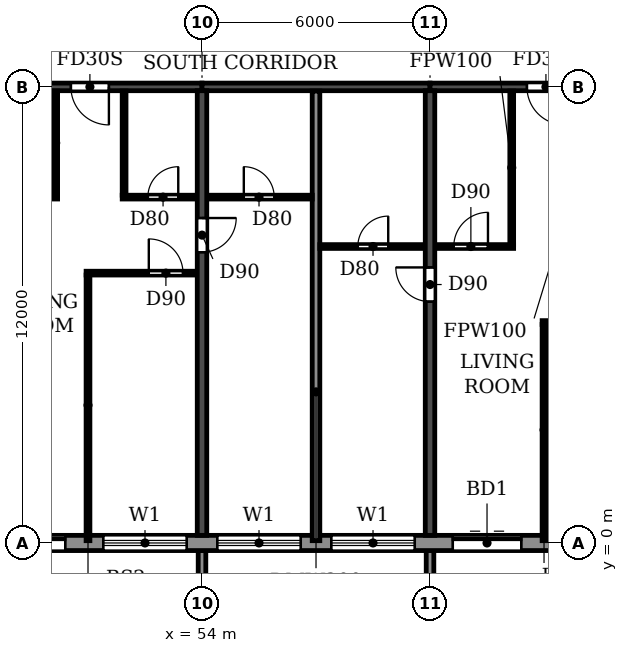
"""IFC4 building model, lengths in metres.
Left out: names, types, materials, properties, quantities, classifications, styles, units other than length and angle.
Written with IfcOpenShell. Run it as: python <this file> out.ifc"""

import sys

from ifc_helpers import new_model, si_unit, direction, frame, frame_2d, origin, place, context, subcontext, project, spatial, polyline, rectangle, outline, extrude, source, transform, mapped, element, fill, save


model = new_model("IFC4")
c1 = context("Model", 3, precision=1e-05, world=origin(), true_north=direction((0.0, 1.0)))
c2 = subcontext(c1, "Body", "Model", "MODEL_VIEW")
j1 = project(units=[si_unit("LENGTHUNIT", "METRE"), si_unit("PLANEANGLEUNIT", "RADIAN")], contexts=[c1])
p1 = place(None, origin())
s1 = spatial("IfcSite", under=j1, at=p1, CompositionType="ELEMENT")
p2 = place(p1, origin())
s2 = spatial("IfcBuilding", under=s1, at=p2, CompositionType="ELEMENT")
p3 = place(p2, frame((0.0, 0.0, 221.4)))
s3 = spatial("IfcBuildingStorey", under=s2, at=p3, CompositionType="ELEMENT", Elevation=221.4)
p4 = place(p3, frame((54.0, 0.2, 0.0), z_axis=(0.0, 0.0, 1.0), x_axis=(0.0, 1.0, 0.0)))
e1 = element("IfcWall", 1, at=p4, inside=s3, PredefinedType="SHEAR", context=c2, shape_type="SweptSolid", body=[
    extrude(rectangle(XDim=11.7, YDim=0.25, at=frame_2d((5.85, 0.0))), origin(), (0.0, 0.0, 1.0), 3.08),
])
p5 = place(p4, frame((7.45, 0.0, 0.0)))
e2 = element("IfcOpeningElement", 2, at=p5, cuts=e1, PredefinedType="OPENING", context=c2, shape_type="SweptSolid", body=[
    extrude(rectangle(XDim=0.9, YDim=2.1, at=frame_2d((0.45, 1.05))), frame((0.0, 0.135, 0.0), z_axis=(0.0, -1.0, 0.0), x_axis=(1.0, 0.0, 0.0)), (0.0, 0.0, 1.0), 0.27),
])
p6 = place(p3, frame((60.0, 0.2, 0.0), z_axis=(0.0, 0.0, 1.0), x_axis=(0.0, 1.0, 0.0)))
e3 = element("IfcWall", 3, at=p6, inside=s3, PredefinedType="SHEAR", context=c2, shape_type="SweptSolid", body=[
    extrude(rectangle(XDim=11.7, YDim=0.25, at=frame_2d((5.85, 0.0))), origin(), (0.0, 0.0, 1.0), 3.08),
])
p7 = place(p6, frame((6.15, 0.0, 0.0)))
e4 = element("IfcOpeningElement", 4, at=p7, cuts=e3, PredefinedType="OPENING", context=c2, shape_type="SweptSolid", body=[
    extrude(rectangle(XDim=0.9, YDim=2.1, at=frame_2d((0.45, 1.05))), frame((0.0, 0.135, 0.0), z_axis=(0.0, -1.0, 0.0), x_axis=(1.0, 0.0, 0.0)), (0.0, 0.0, 1.0), 0.27),
])
p8 = place(p3, frame((48.0, 12.0, 0.0), z_axis=(0.0, 0.0, 1.0), x_axis=(1.0, 0.0, 0.0)))
e5 = element("IfcWall", 5, at=p8, inside=s3, PredefinedType="SHEAR", context=c2, shape_type="SweptSolid", body=[
    extrude(rectangle(XDim=6.0, YDim=0.2, at=frame_2d((3.0, 0.0))), origin(), (0.0, 0.0, 1.0), 2.48),
])
p9 = place(p8, frame((2.55, 0.0, 0.0)))
e6 = element("IfcOpeningElement", 6, at=p9, cuts=e5, PredefinedType="OPENING", context=c2, shape_type="SweptSolid", body=[
    extrude(rectangle(XDim=1.0, YDim=2.1, at=frame_2d((0.5, 1.05))), frame((0.0, 0.11, 0.0), z_axis=(0.0, -1.0, 0.0), x_axis=(1.0, 0.0, 0.0)), (0.0, 0.0, 1.0), 0.22),
])
p10 = place(p3, frame((54.0, 12.0, 0.0), z_axis=(0.0, 0.0, 1.0), x_axis=(1.0, 0.0, 0.0)))
e7 = element("IfcWall", 7, at=p10, inside=s3, PredefinedType="SHEAR", context=c2, shape_type="SweptSolid", body=[
    extrude(rectangle(XDim=6.0, YDim=0.2, at=frame_2d((3.0, 0.0))), origin(), (0.0, 0.0, 1.0), 2.48),
])
p11 = place(p3, frame((60.0, 12.0, 0.0), z_axis=(0.0, 0.0, 1.0), x_axis=(1.0, 0.0, 0.0)))
e8 = element("IfcWall", 8, at=p11, inside=s3, PredefinedType="SHEAR", context=c2, shape_type="SweptSolid", body=[
    extrude(rectangle(XDim=6.0, YDim=0.2, at=frame_2d((3.0, 0.0))), origin(), (0.0, 0.0, 1.0), 2.48),
])
p12 = place(p11, frame((2.55, 0.0, 0.0)))
e9 = element("IfcOpeningElement", 9, at=p12, cuts=e8, PredefinedType="OPENING", context=c2, shape_type="SweptSolid", body=[
    extrude(rectangle(XDim=1.0, YDim=2.1, at=frame_2d((0.5, 1.05))), frame((0.0, 0.11, 0.0), z_axis=(0.0, -1.0, 0.0), x_axis=(1.0, 0.0, 0.0)), (0.0, 0.0, 1.0), 0.22),
])
p13 = place(p3, frame((22.683, 0.0, 0.0), z_axis=(0.0, 0.0, 1.0), x_axis=(1.0, 0.0, 0.0)))
e10 = element("IfcWall", 10, at=p13, inside=s3, PredefinedType="STANDARD", context=c2, shape_type="SweptSolid", body=[
    extrude(rectangle(XDim=56.634, YDim=0.4, at=frame_2d((28.317, 0.0))), origin(), (0.0, 0.0, 1.0), 3.08),
])
p14 = place(p13, frame((1.717, 0.0, 0.9)))
e11 = element("IfcOpeningElement", 11, at=p14, cuts=e10, PredefinedType="OPENING", context=c2, shape_type="SweptSolid", body=[
    extrude(rectangle(XDim=2.2, YDim=1.5, at=frame_2d((1.1, 0.75))), frame((0.0, 0.21, 0.0), z_axis=(0.0, -1.0, 0.0), x_axis=(1.0, 0.0, 0.0)), (0.0, 0.0, 1.0), 0.42),
])
p15 = place(p13, frame((4.917, 0.0, 0.0)))
e12 = element("IfcOpeningElement", 12, at=p15, cuts=e10, PredefinedType="OPENING", context=c2, shape_type="SweptSolid", body=[
    extrude(rectangle(XDim=1.8, YDim=2.4, at=frame_2d((0.9, 1.2))), frame((0.0, 0.21, 0.0), z_axis=(0.0, -1.0, 0.0), x_axis=(1.0, 0.0, 0.0)), (0.0, 0.0, 1.0), 0.42),
])
p16 = place(p13, frame((7.717, 0.0, 0.9)))
e13 = element("IfcOpeningElement", 13, at=p16, cuts=e10, PredefinedType="OPENING", context=c2, shape_type="SweptSolid", body=[
    extrude(rectangle(XDim=2.2, YDim=1.5, at=frame_2d((1.1, 0.75))), frame((0.0, 0.21, 0.0), z_axis=(0.0, -1.0, 0.0), x_axis=(1.0, 0.0, 0.0)), (0.0, 0.0, 1.0), 0.42),
])
p17 = place(p13, frame((10.717, 0.0, 0.9)))
e14 = element("IfcOpeningElement", 14, at=p17, cuts=e10, PredefinedType="OPENING", context=c2, shape_type="SweptSolid", body=[
    extrude(rectangle(XDim=2.2, YDim=1.5, at=frame_2d((1.1, 0.75))), frame((0.0, 0.21, 0.0), z_axis=(0.0, -1.0, 0.0), x_axis=(1.0, 0.0, 0.0)), (0.0, 0.0, 1.0), 0.42),
])
p18 = place(p13, frame((13.717, 0.0, 0.9)))
e15 = element("IfcOpeningElement", 15, at=p18, cuts=e10, PredefinedType="OPENING", context=c2, shape_type="SweptSolid", body=[
    extrude(rectangle(XDim=2.2, YDim=1.5, at=frame_2d((1.1, 0.75))), frame((0.0, 0.21, 0.0), z_axis=(0.0, -1.0, 0.0), x_axis=(1.0, 0.0, 0.0)), (0.0, 0.0, 1.0), 0.42),
])
p19 = place(p13, frame((16.917, 0.0, 0.0)))
e16 = element("IfcOpeningElement", 16, at=p19, cuts=e10, PredefinedType="OPENING", context=c2, shape_type="SweptSolid", body=[
    extrude(rectangle(XDim=1.8, YDim=2.4, at=frame_2d((0.9, 1.2))), frame((0.0, 0.21, 0.0), z_axis=(0.0, -1.0, 0.0), x_axis=(1.0, 0.0, 0.0)), (0.0, 0.0, 1.0), 0.42),
])
p20 = place(p13, frame((19.717, 0.0, 0.9)))
e17 = element("IfcOpeningElement", 17, at=p20, cuts=e10, PredefinedType="OPENING", context=c2, shape_type="SweptSolid", body=[
    extrude(rectangle(XDim=2.2, YDim=1.5, at=frame_2d((1.1, 0.75))), frame((0.0, 0.21, 0.0), z_axis=(0.0, -1.0, 0.0), x_axis=(1.0, 0.0, 0.0)), (0.0, 0.0, 1.0), 0.42),
])
p21 = place(p13, frame((22.717, 0.0, 0.9)))
e18 = element("IfcOpeningElement", 18, at=p21, cuts=e10, PredefinedType="OPENING", context=c2, shape_type="SweptSolid", body=[
    extrude(rectangle(XDim=2.2, YDim=1.5, at=frame_2d((1.1, 0.75))), frame((0.0, 0.21, 0.0), z_axis=(0.0, -1.0, 0.0), x_axis=(1.0, 0.0, 0.0)), (0.0, 0.0, 1.0), 0.42),
])
p22 = place(p13, frame((25.917, 0.0, 0.0)))
e19 = element("IfcOpeningElement", 19, at=p22, cuts=e10, PredefinedType="OPENING", context=c2, shape_type="SweptSolid", body=[
    extrude(rectangle(XDim=1.8, YDim=2.4, at=frame_2d((0.9, 1.2))), frame((0.0, 0.21, 0.0), z_axis=(0.0, -1.0, 0.0), x_axis=(1.0, 0.0, 0.0)), (0.0, 0.0, 1.0), 0.42),
])
p23 = place(p13, frame((28.717, 0.0, 0.9)))
e20 = element("IfcOpeningElement", 20, at=p23, cuts=e10, PredefinedType="OPENING", context=c2, shape_type="SweptSolid", body=[
    extrude(rectangle(XDim=2.2, YDim=1.5, at=frame_2d((1.1, 0.75))), frame((0.0, 0.21, 0.0), z_axis=(0.0, -1.0, 0.0), x_axis=(1.0, 0.0, 0.0)), (0.0, 0.0, 1.0), 0.42),
])
p24 = place(p13, frame((31.717, 0.0, 0.9)))
e21 = element("IfcOpeningElement", 21, at=p24, cuts=e10, PredefinedType="OPENING", context=c2, shape_type="SweptSolid", body=[
    extrude(rectangle(XDim=2.2, YDim=1.5, at=frame_2d((1.1, 0.75))), frame((0.0, 0.21, 0.0), z_axis=(0.0, -1.0, 0.0), x_axis=(1.0, 0.0, 0.0)), (0.0, 0.0, 1.0), 0.42),
])
p25 = place(p13, frame((34.717, 0.0, 0.9)))
e22 = element("IfcOpeningElement", 22, at=p25, cuts=e10, PredefinedType="OPENING", context=c2, shape_type="SweptSolid", body=[
    extrude(rectangle(XDim=2.2, YDim=1.5, at=frame_2d((1.1, 0.75))), frame((0.0, 0.21, 0.0), z_axis=(0.0, -1.0, 0.0), x_axis=(1.0, 0.0, 0.0)), (0.0, 0.0, 1.0), 0.42),
])
p26 = place(p13, frame((37.917, 0.0, 0.0)))
e23 = element("IfcOpeningElement", 23, at=p26, cuts=e10, PredefinedType="OPENING", context=c2, shape_type="SweptSolid", body=[
    extrude(rectangle(XDim=1.8, YDim=2.4, at=frame_2d((0.9, 1.2))), frame((0.0, 0.21, 0.0), z_axis=(0.0, -1.0, 0.0), x_axis=(1.0, 0.0, 0.0)), (0.0, 0.0, 1.0), 0.42),
])
p27 = place(p13, frame((40.717, 0.0, 0.9)))
e24 = element("IfcOpeningElement", 24, at=p27, cuts=e10, PredefinedType="OPENING", context=c2, shape_type="SweptSolid", body=[
    extrude(rectangle(XDim=2.2, YDim=1.5, at=frame_2d((1.1, 0.75))), frame((0.0, 0.21, 0.0), z_axis=(0.0, -1.0, 0.0), x_axis=(1.0, 0.0, 0.0)), (0.0, 0.0, 1.0), 0.42),
])
p28 = place(p13, frame((43.717, 0.0, 0.9)))
e25 = element("IfcOpeningElement", 25, at=p28, cuts=e10, PredefinedType="OPENING", context=c2, shape_type="SweptSolid", body=[
    extrude(rectangle(XDim=2.2, YDim=1.5, at=frame_2d((1.1, 0.75))), frame((0.0, 0.21, 0.0), z_axis=(0.0, -1.0, 0.0), x_axis=(1.0, 0.0, 0.0)), (0.0, 0.0, 1.0), 0.42),
])
p29 = place(p13, frame((46.717, 0.0, 0.9)))
e26 = element("IfcOpeningElement", 26, at=p29, cuts=e10, PredefinedType="OPENING", context=c2, shape_type="SweptSolid", body=[
    extrude(rectangle(XDim=2.2, YDim=1.5, at=frame_2d((1.1, 0.75))), frame((0.0, 0.21, 0.0), z_axis=(0.0, -1.0, 0.0), x_axis=(1.0, 0.0, 0.0)), (0.0, 0.0, 1.0), 0.42),
])
p30 = place(p13, frame((49.917, 0.0, 0.0)))
e27 = element("IfcOpeningElement", 27, at=p30, cuts=e10, PredefinedType="OPENING", context=c2, shape_type="SweptSolid", body=[
    extrude(rectangle(XDim=1.8, YDim=2.4, at=frame_2d((0.9, 1.2))), frame((0.0, 0.21, 0.0), z_axis=(0.0, -1.0, 0.0), x_axis=(1.0, 0.0, 0.0)), (0.0, 0.0, 1.0), 0.42),
])
p31 = place(p13, frame((52.717, 0.0, 0.9)))
e28 = element("IfcOpeningElement", 28, at=p31, cuts=e10, PredefinedType="OPENING", context=c2, shape_type="SweptSolid", body=[
    extrude(rectangle(XDim=2.2, YDim=1.5, at=frame_2d((1.1, 0.75))), frame((0.0, 0.21, 0.0), z_axis=(0.0, -1.0, 0.0), x_axis=(1.0, 0.0, 0.0)), (0.0, 0.0, 1.0), 0.42),
])
m1 = source(origin(), c2, "Body", "SweptSolid", [
    extrude(outline(polyline([(0.0, 0.0), (0.2, 0.0), (0.2, 1.65), (0.0, 1.65), (0.0, 0.0)])), origin(), (0.0, 0.0, 1.0), 3.1),
])
for number, where in (
    (29, (53.9, -1.85, 0.0)),
    (30, (59.9, -1.85, 0.0)),
):
    element("IfcWall", number, at=place(p3, frame(where)), inside=s3, PredefinedType="STANDARD", context=c2, shape_type="MappedRepresentation", body=[
        mapped(m1, transform((0.0, 0.0, 0.0))),
    ])
p32 = place(p3, frame((57.0, 0.06, 0.0), z_axis=(0.0, 0.0, 1.0), x_axis=(0.0, 1.0, 0.0)))
e31 = element("IfcWall", 31, at=p32, inside=s3, PredefinedType="PARTITIONING", context=c2, shape_type="SweptSolid", body=[
    extrude(rectangle(XDim=11.83, YDim=0.2, at=frame_2d((5.915, 0.0))), origin(), (0.0, 0.0, 1.0), 3.08),
])
p33 = place(p3, frame((62.95, 5.8, 0.0), z_axis=(0.0, 0.0, 1.0), x_axis=(1.0, 0.0, 0.0)))
e32 = element("IfcWall", 32, at=p33, inside=s3, PredefinedType="PARTITIONING", context=c2, shape_type="SweptSolid", body=[
    extrude(rectangle(XDim=2.915, YDim=0.1, at=frame_2d((1.458, 0.0))), origin(), (0.0, 0.0, 1.0), 3.08),
])
p34 = place(p33, frame((0.55, 0.0, 0.0)))
e33 = element("IfcOpeningElement", 33, at=p34, cuts=e32, PredefinedType="OPENING", context=c2, shape_type="SweptSolid", body=[
    extrude(rectangle(XDim=0.9, YDim=2.1, at=frame_2d((0.45, 1.05))), frame((0.0, 0.06, 0.0), z_axis=(0.0, -1.0, 0.0), x_axis=(1.0, 0.0, 0.0)), (0.0, 0.0, 1.0), 0.12),
])
p35 = place(p3, frame((50.95, 7.1, 0.0), z_axis=(0.0, 0.0, 1.0), x_axis=(1.0, 0.0, 0.0)))
e34 = element("IfcWall", 34, at=p35, inside=s3, PredefinedType="PARTITIONING", context=c2, shape_type="SweptSolid", body=[
    extrude(rectangle(XDim=2.915, YDim=0.1, at=frame_2d((1.458, 0.0))), origin(), (0.0, 0.0, 1.0), 3.08),
])
p36 = place(p35, frame((1.65, 0.0, 0.0)))
e35 = element("IfcOpeningElement", 35, at=p36, cuts=e34, PredefinedType="OPENING", context=c2, shape_type="SweptSolid", body=[
    extrude(rectangle(XDim=0.9, YDim=2.1, at=frame_2d((0.45, 1.05))), frame((0.0, 0.06, 0.0), z_axis=(0.0, -1.0, 0.0), x_axis=(1.0, 0.0, 0.0)), (0.0, 0.0, 1.0), 0.12),
])
p37 = place(p3, frame((57.1, 7.8, 0.0), z_axis=(0.0, 0.0, 1.0), x_axis=(1.0, 0.0, 0.0)))
e36 = element("IfcWall", 36, at=p37, inside=s3, PredefinedType="PARTITIONING", context=c2, shape_type="SweptSolid", body=[
    extrude(rectangle(XDim=2.765, YDim=0.1, at=frame_2d((1.382, 0.0))), origin(), (0.0, 0.0, 1.0), 3.08),
])
p38 = place(p37, frame((1.0, 0.0, 0.0)))
e37 = element("IfcOpeningElement", 37, at=p38, cuts=e36, PredefinedType="OPENING", context=c2, shape_type="SweptSolid", body=[
    extrude(rectangle(XDim=0.8, YDim=2.1, at=frame_2d((0.4, 1.05))), frame((0.0, 0.06, 0.0), z_axis=(0.0, -1.0, 0.0), x_axis=(1.0, 0.0, 0.0)), (0.0, 0.0, 1.0), 0.12),
])
p39 = place(p3, frame((60.135, 7.8, 0.0), z_axis=(0.0, 0.0, 1.0), x_axis=(1.0, 0.0, 0.0)))
e38 = element("IfcWall", 38, at=p39, inside=s3, PredefinedType="PARTITIONING", context=c2, shape_type="SweptSolid", body=[
    extrude(rectangle(XDim=2.065, YDim=0.1, at=frame_2d((1.032, 0.0))), origin(), (0.0, 0.0, 1.0), 3.08),
])
p40 = place(p39, frame((0.49, 0.0, 0.0)))
e39 = element("IfcOpeningElement", 39, at=p40, cuts=e38, PredefinedType="OPENING", context=c2, shape_type="SweptSolid", body=[
    extrude(rectangle(XDim=0.9, YDim=2.1, at=frame_2d((0.45, 1.05))), frame((0.0, 0.06, 0.0), z_axis=(0.0, -1.0, 0.0), x_axis=(1.0, 0.0, 0.0)), (0.0, 0.0, 1.0), 0.12),
])
p41 = place(p3, frame((48.135, 9.1, 0.0), z_axis=(0.0, 0.0, 1.0), x_axis=(1.0, 0.0, 0.0)))
e40 = element("IfcWall", 40, at=p41, inside=s3, PredefinedType="PARTITIONING", context=c2, shape_type="SweptSolid", body=[
    extrude(rectangle(XDim=2.065, YDim=0.1, at=frame_2d((1.032, 0.0))), origin(), (0.0, 0.0, 1.0), 3.08),
])
p42 = place(p41, frame((0.49, 0.0, 0.0)))
e41 = element("IfcOpeningElement", 41, at=p42, cuts=e40, PredefinedType="OPENING", context=c2, shape_type="SweptSolid", body=[
    extrude(rectangle(XDim=0.9, YDim=2.1, at=frame_2d((0.45, 1.05))), frame((0.0, 0.06, 0.0), z_axis=(0.0, -1.0, 0.0), x_axis=(1.0, 0.0, 0.0)), (0.0, 0.0, 1.0), 0.12),
])
p43 = place(p3, frame((51.9, 9.1, 0.0), z_axis=(0.0, 0.0, 1.0), x_axis=(1.0, 0.0, 0.0)))
e42 = element("IfcWall", 42, at=p43, inside=s3, PredefinedType="PARTITIONING", context=c2, shape_type="SweptSolid", body=[
    extrude(rectangle(XDim=1.965, YDim=0.1, at=frame_2d((0.982, 0.0))), origin(), (0.0, 0.0, 1.0), 3.08),
])
p44 = place(p43, frame((0.675, 0.0, 0.0)))
e43 = element("IfcOpeningElement", 43, at=p44, cuts=e42, PredefinedType="OPENING", context=c2, shape_type="SweptSolid", body=[
    extrude(rectangle(XDim=0.8, YDim=2.1, at=frame_2d((0.4, 1.05))), frame((0.0, 0.06, 0.0), z_axis=(0.0, -1.0, 0.0), x_axis=(1.0, 0.0, 0.0)), (0.0, 0.0, 1.0), 0.12),
])
p45 = place(p3, frame((54.135, 9.1, 0.0), z_axis=(0.0, 0.0, 1.0), x_axis=(1.0, 0.0, 0.0)))
e44 = element("IfcWall", 44, at=p45, inside=s3, PredefinedType="PARTITIONING", context=c2, shape_type="SweptSolid", body=[
    extrude(rectangle(XDim=2.765, YDim=0.1, at=frame_2d((1.382, 0.0))), origin(), (0.0, 0.0, 1.0), 3.08),
])
p46 = place(p45, frame((0.965, 0.0, 0.0)))
e45 = element("IfcOpeningElement", 45, at=p46, cuts=e44, PredefinedType="OPENING", context=c2, shape_type="SweptSolid", body=[
    extrude(rectangle(XDim=0.8, YDim=2.1, at=frame_2d((0.4, 1.05))), frame((0.0, 0.06, 0.0), z_axis=(0.0, -1.0, 0.0), x_axis=(1.0, 0.0, 0.0)), (0.0, 0.0, 1.0), 0.12),
])
p47 = place(p3, frame((50.15, 9.15, 0.0), z_axis=(0.0, 0.0, 1.0), x_axis=(0.0, 1.0, 0.0)))
e46 = element("IfcWall", 46, at=p47, inside=s3, PredefinedType="PARTITIONING", context=c2, shape_type="SweptSolid", body=[
    extrude(rectangle(XDim=2.74, YDim=0.1, at=frame_2d((1.37, 0.0))), origin(), (0.0, 0.0, 1.0), 3.08),
])
p48 = place(p3, frame((51.0, 0.06, 0.0), z_axis=(0.0, 0.0, 1.0), x_axis=(0.0, 1.0, 0.0)))
e47 = element("IfcWall", 47, at=p48, inside=s3, PredefinedType="PARTITIONING", context=c2, shape_type="SweptSolid", body=[
    extrude(rectangle(XDim=6.99, YDim=0.1, at=frame_2d((3.495, 0.0))), origin(), (0.0, 0.0, 1.0), 3.08),
])
p49 = place(p3, frame((51.95, 9.15, 0.0), z_axis=(0.0, 0.0, 1.0), x_axis=(0.0, 1.0, 0.0)))
e48 = element("IfcWall", 48, at=p49, inside=s3, PredefinedType="PARTITIONING", context=c2, shape_type="SweptSolid", body=[
    extrude(rectangle(XDim=2.74, YDim=0.1, at=frame_2d((1.37, 0.0))), origin(), (0.0, 0.0, 1.0), 3.08),
])
p50 = place(p3, frame((62.15, 7.85, 0.0), z_axis=(0.0, 0.0, 1.0), x_axis=(0.0, 1.0, 0.0)))
e49 = element("IfcWall", 49, at=p50, inside=s3, PredefinedType="PARTITIONING", context=c2, shape_type="SweptSolid", body=[
    extrude(rectangle(XDim=4.04, YDim=0.1, at=frame_2d((2.02, 0.0))), origin(), (0.0, 0.0, 1.0), 3.08),
])
p51 = place(p3, frame((63.0, 0.06, 0.0), z_axis=(0.0, 0.0, 1.0), x_axis=(0.0, 1.0, 0.0)))
e50 = element("IfcWall", 50, at=p51, inside=s3, PredefinedType="PARTITIONING", context=c2, shape_type="SweptSolid", body=[
    extrude(rectangle(XDim=5.69, YDim=0.1, at=frame_2d((2.845, 0.0))), origin(), (0.0, 0.0, 1.0), 3.08),
])
p52 = place(p22, origin())
e51 = element("IfcDoor", 51, at=p52, inside=s3, OperationType="DOUBLE_DOOR_SLIDING", PredefinedType="DOOR", context=c2, shape_type="SweptSolid", body=[
    extrude(rectangle(XDim=1.8, YDim=2.4, at=frame_2d((0.9, 1.2))), frame((0.0, 0.025, 0.0), z_axis=(0.0, -1.0, 0.0), x_axis=(1.0, 0.0, 0.0)), (0.0, 0.0, 1.0), 0.05),
])
fill(e19, e51)
p53 = place(p23, origin())
e52 = element("IfcWindow", 52, at=p53, inside=s3, PartitioningType="DOUBLE_PANEL_HORIZONTAL", PredefinedType="WINDOW", context=c2, shape_type="SweptSolid", body=[
    extrude(rectangle(XDim=2.2, YDim=1.5, at=frame_2d((1.1, 0.75))), frame((0.0, 0.03, 0.0), z_axis=(0.0, -1.0, 0.0), x_axis=(1.0, 0.0, 0.0)), (0.0, 0.0, 1.0), 0.06),
])
fill(e20, e52)
p54 = place(p24, origin())
e53 = element("IfcWindow", 53, at=p54, inside=s3, PartitioningType="DOUBLE_PANEL_HORIZONTAL", PredefinedType="WINDOW", context=c2, shape_type="SweptSolid", body=[
    extrude(rectangle(XDim=2.2, YDim=1.5, at=frame_2d((1.1, 0.75))), frame((0.0, 0.03, 0.0), z_axis=(0.0, -1.0, 0.0), x_axis=(1.0, 0.0, 0.0)), (0.0, 0.0, 1.0), 0.06),
])
fill(e21, e53)
p55 = place(p25, origin())
e54 = element("IfcWindow", 54, at=p55, inside=s3, PartitioningType="DOUBLE_PANEL_HORIZONTAL", PredefinedType="WINDOW", context=c2, shape_type="SweptSolid", body=[
    extrude(rectangle(XDim=2.2, YDim=1.5, at=frame_2d((1.1, 0.75))), frame((0.0, 0.03, 0.0), z_axis=(0.0, -1.0, 0.0), x_axis=(1.0, 0.0, 0.0)), (0.0, 0.0, 1.0), 0.06),
])
fill(e22, e54)
p56 = place(p26, origin())
e55 = element("IfcDoor", 55, at=p56, inside=s3, OperationType="DOUBLE_DOOR_SLIDING", PredefinedType="DOOR", context=c2, shape_type="SweptSolid", body=[
    extrude(rectangle(XDim=1.8, YDim=2.4, at=frame_2d((0.9, 1.2))), frame((0.0, 0.025, 0.0), z_axis=(0.0, -1.0, 0.0), x_axis=(1.0, 0.0, 0.0)), (0.0, 0.0, 1.0), 0.05),
])
fill(e23, e55)
p57 = place(p46, origin())
e56 = element("IfcDoor", 56, at=p57, inside=s3, OperationType="SINGLE_SWING_LEFT", PredefinedType="DOOR", context=c2, shape_type="SweptSolid", body=[
    extrude(rectangle(XDim=0.8, YDim=2.1, at=frame_2d((0.4, 1.05))), frame((0.0, 0.025, 0.0), z_axis=(0.0, -1.0, 0.0), x_axis=(1.0, 0.0, 0.0)), (0.0, 0.0, 1.0), 0.05),
])
fill(e45, e56)
p58 = place(p9, frame((1.0, 0.0, 0.0), z_axis=(0.0, 0.0, 1.0), x_axis=(-1.0, 0.0, 0.0)))
e57 = element("IfcDoor", 57, at=p58, inside=s3, OperationType="SINGLE_SWING_LEFT", PredefinedType="DOOR", context=c2, shape_type="SweptSolid", body=[
    extrude(rectangle(XDim=1.0, YDim=2.1, at=frame_2d((0.5, 1.05))), frame((0.0, 0.025, 0.0), z_axis=(0.0, -1.0, 0.0), x_axis=(1.0, 0.0, 0.0)), (0.0, 0.0, 1.0), 0.05),
])
fill(e6, e57)
p59 = place(p44, origin())
e58 = element("IfcDoor", 58, at=p59, inside=s3, OperationType="SINGLE_SWING_RIGHT", PredefinedType="DOOR", context=c2, shape_type="SweptSolid", body=[
    extrude(rectangle(XDim=0.8, YDim=2.1, at=frame_2d((0.4, 1.05))), frame((0.0, 0.025, 0.0), z_axis=(0.0, -1.0, 0.0), x_axis=(1.0, 0.0, 0.0)), (0.0, 0.0, 1.0), 0.05),
])
fill(e43, e58)
p60 = place(p36, origin())
e59 = element("IfcDoor", 59, at=p60, inside=s3, OperationType="SINGLE_SWING_LEFT", PredefinedType="DOOR", context=c2, shape_type="SweptSolid", body=[
    extrude(rectangle(XDim=0.9, YDim=2.1, at=frame_2d((0.45, 1.05))), frame((0.0, 0.025, 0.0), z_axis=(0.0, -1.0, 0.0), x_axis=(1.0, 0.0, 0.0)), (0.0, 0.0, 1.0), 0.05),
])
fill(e35, e59)
p61 = place(p5, frame((0.9, 0.0, 0.0), z_axis=(0.0, 0.0, 1.0), x_axis=(-1.0, 0.0, 0.0)))
e60 = element("IfcDoor", 60, at=p61, inside=s3, OperationType="SINGLE_SWING_LEFT", PredefinedType="DOOR", context=c2, shape_type="SweptSolid", body=[
    extrude(rectangle(XDim=0.9, YDim=2.1, at=frame_2d((0.45, 1.05))), frame((0.0, 0.025, 0.0), z_axis=(0.0, -1.0, 0.0), x_axis=(1.0, 0.0, 0.0)), (0.0, 0.0, 1.0), 0.05),
])
fill(e2, e60)
p62 = place(p38, origin())
e61 = element("IfcDoor", 61, at=p62, inside=s3, OperationType="SINGLE_SWING_RIGHT", PredefinedType="DOOR", context=c2, shape_type="SweptSolid", body=[
    extrude(rectangle(XDim=0.8, YDim=2.1, at=frame_2d((0.4, 1.05))), frame((0.0, 0.025, 0.0), z_axis=(0.0, -1.0, 0.0), x_axis=(1.0, 0.0, 0.0)), (0.0, 0.0, 1.0), 0.05),
])
fill(e37, e61)
p63 = place(p7, origin())
e62 = element("IfcDoor", 62, at=p63, inside=s3, OperationType="SINGLE_SWING_RIGHT", PredefinedType="DOOR", context=c2, shape_type="SweptSolid", body=[
    extrude(rectangle(XDim=0.9, YDim=2.1, at=frame_2d((0.45, 1.05))), frame((0.0, 0.025, 0.0), z_axis=(0.0, -1.0, 0.0), x_axis=(1.0, 0.0, 0.0)), (0.0, 0.0, 1.0), 0.05),
])
fill(e4, e62)
p64 = place(p40, origin())
e63 = element("IfcDoor", 63, at=p64, inside=s3, OperationType="SINGLE_SWING_RIGHT", PredefinedType="DOOR", context=c2, shape_type="SweptSolid", body=[
    extrude(rectangle(XDim=0.9, YDim=2.1, at=frame_2d((0.45, 1.05))), frame((0.0, 0.025, 0.0), z_axis=(0.0, -1.0, 0.0), x_axis=(1.0, 0.0, 0.0)), (0.0, 0.0, 1.0), 0.05),
])
fill(e39, e63)
p65 = place(p12, frame((1.0, 0.0, 0.0), z_axis=(0.0, 0.0, 1.0), x_axis=(-1.0, 0.0, 0.0)))
e64 = element("IfcDoor", 64, at=p65, inside=s3, OperationType="SINGLE_SWING_LEFT", PredefinedType="DOOR", context=c2, shape_type="SweptSolid", body=[
    extrude(rectangle(XDim=1.0, YDim=2.1, at=frame_2d((0.5, 1.05))), frame((0.0, 0.025, 0.0), z_axis=(0.0, -1.0, 0.0), x_axis=(1.0, 0.0, 0.0)), (0.0, 0.0, 1.0), 0.05),
])
fill(e9, e64)
save(model, sys.argv[1])
